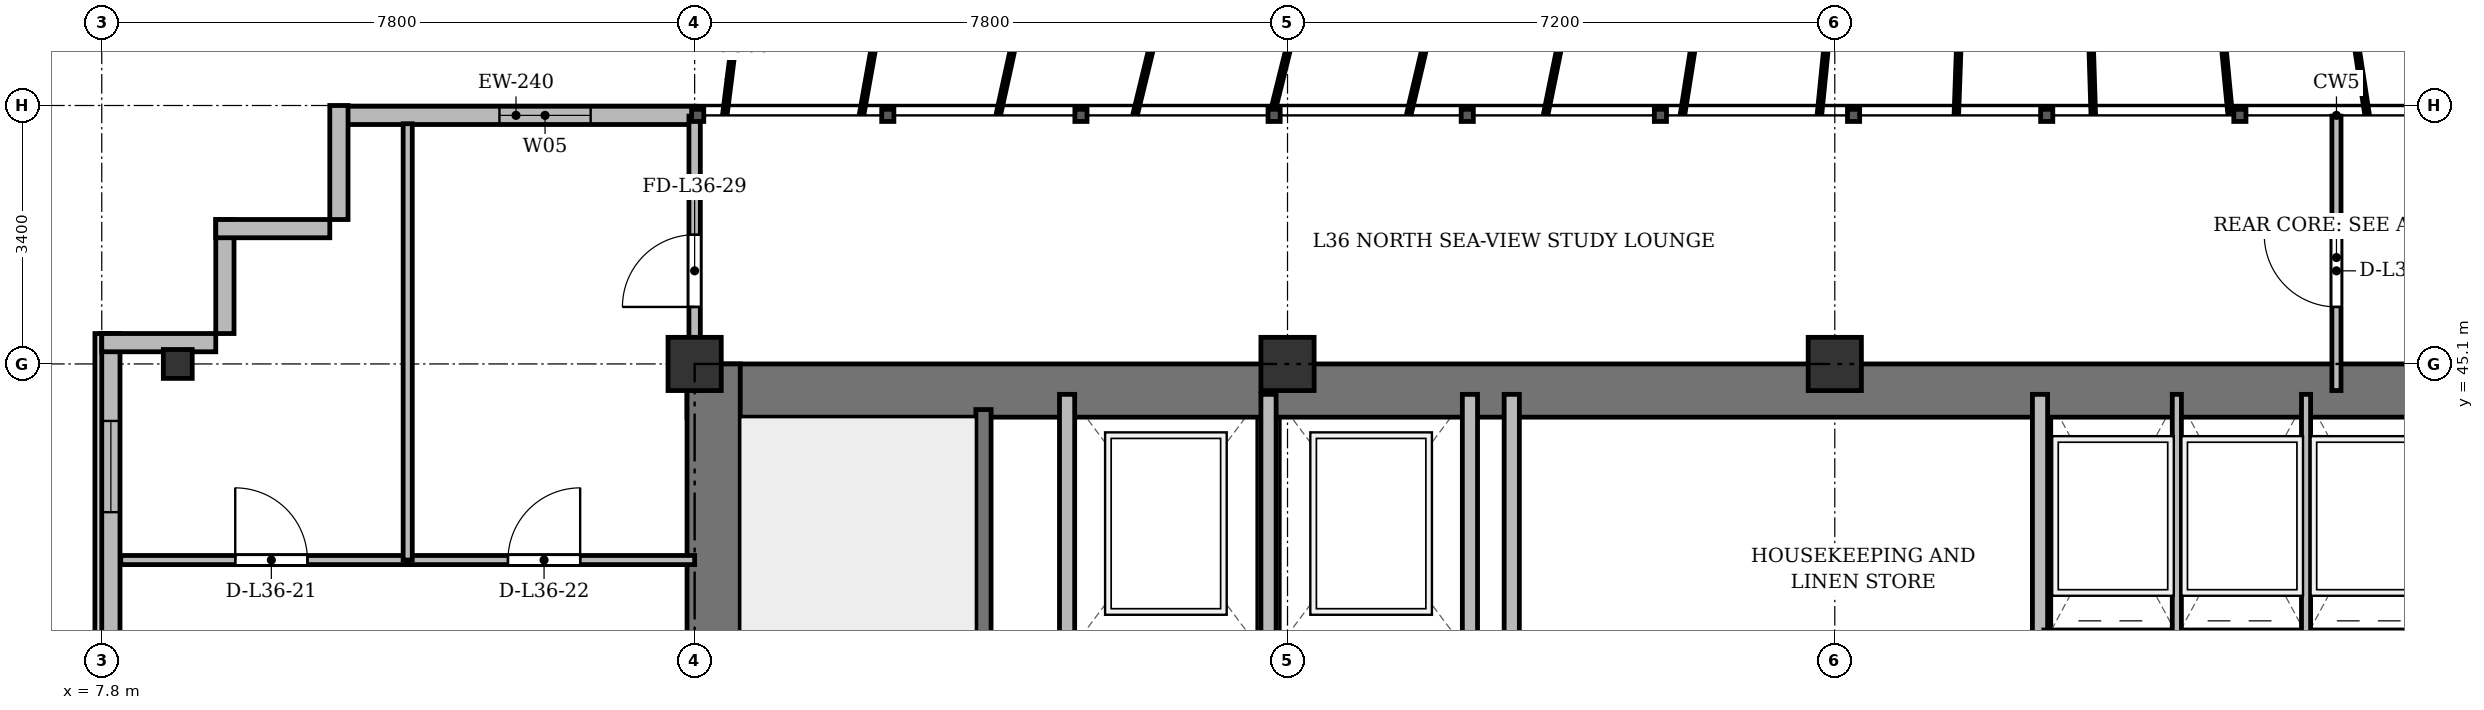
"""IFC4 building model, lengths in metres.
Left out: names, types, materials, properties, quantities, classifications, styles, units other than length and angle.
Written with IfcOpenShell. Run it as: python <this file> out.ifc"""

import sys

from ifc_helpers import new_model, si_unit, direction, frame, frame_2d, origin, origin_2d, place, context, subcontext, project, spatial, rectangle, i_section, extrude, source, transform, mapped, element, fill, save


model = new_model("IFC4")
c1 = context("Model", 3, precision=1e-05, world=origin(), true_north=direction((0.0, 1.0)))
c2 = subcontext(c1, "Body", "Model", "MODEL_VIEW")
j1 = project(units=[si_unit("LENGTHUNIT", "METRE"), si_unit("PLANEANGLEUNIT", "RADIAN")], contexts=[c1])
p1 = place(None, origin())
s1 = spatial("IfcSite", under=j1, at=p1, CompositionType="ELEMENT")
p2 = place(p1, origin())
s2 = spatial("IfcBuilding", under=s1, at=p2, CompositionType="ELEMENT")
p3 = place(p2, frame((0.0, 0.0, 139.3)))
s3 = spatial("IfcBuildingStorey", under=s2, at=p3, CompositionType="ELEMENT", Elevation=139.3)
m1 = source(origin(), c2, "Body", "SweptSolid", [
    extrude(i_section(OverallWidth=0.38, OverallDepth=0.38, WebThickness=0.02, FlangeThickness=0.03, at=origin_2d()), origin(), (0.0, 0.0, 1.0), 3.6),
])
p4 = place(p3, frame((8.8, 45.1, 0.0), z_axis=(0.0, 0.0, 1.0), x_axis=(1.0, 0.0, 0.0)))
e1 = element("IfcColumn", 1, at=p4, inside=s3, PredefinedType="COLUMN", context=c2, shape_type="MappedRepresentation", body=[
    mapped(m1, transform((0.0, 0.0, 0.0), x_axis=(1.0, 0.0, 0.0), y_axis=(0.0, 1.0, 0.0), z_axis=(0.0, 0.0, 1.0), scale=1.0)),
])
m2 = source(origin(), c2, "Body", "SweptSolid", [
    extrude(rectangle(XDim=0.7, YDim=0.7, at=origin_2d()), origin(), (0.0, 0.0, 1.0), 3.6),
])
for number, where, z_axis, x_axis in (
    (2, (15.6, 45.1, 0.0), (0.0, 0.0, 1.0), (1.0, 0.0, 0.0)),
    (3, (23.4, 45.1, 0.0), (0.0, 0.0, 1.0), (1.0, 0.0, 0.0)),
    (4, (30.6, 45.1, 0.0), (0.0, 0.0, 1.0), (1.0, 0.0, 0.0)),
):
    element("IfcColumn", number, at=place(p3, frame(where, z_axis=z_axis, x_axis=x_axis)), inside=s3, PredefinedType="COLUMN", context=c2, shape_type="MappedRepresentation", body=[
        mapped(m2, transform((0.0, 0.0, 0.0), x_axis=(1.0, 0.0, 0.0), y_axis=(0.0, 1.0, 0.0), z_axis=(0.0, 0.0, 1.0), scale=1.0)),
    ])
p5 = place(p3, frame((10.9, 48.37, 0.0), z_axis=(0.0, 0.0, 1.0), x_axis=(1.0, 0.0, 0.0)))
e5 = element("IfcWall", 5, at=p5, inside=s3, PredefinedType="SOLIDWALL", context=c2, shape_type="SweptSolid", body=[
    extrude(rectangle(XDim=4.7, YDim=0.24, at=frame_2d((2.35, 0.0))), origin(), (0.0, 0.0, 1.0), 3.35),
])
p6 = place(p5, frame((2.132, 0.0, 0.9)))
e6 = element("IfcOpeningElement", 6, at=p6, cuts=e5, PredefinedType="OPENING", context=c2, shape_type="SweptSolid", body=[
    extrude(rectangle(XDim=1.2, YDim=1.65, at=frame_2d((0.6, 0.825))), frame((0.0, 0.13, 0.0), z_axis=(0.0, -1.0, 0.0), x_axis=(1.0, 0.0, 0.0)), (0.0, 0.0, 1.0), 0.26),
])
p7 = place(p3, frame((7.92, 6.3, 0.0), z_axis=(0.0, 0.0, 1.0), x_axis=(0.0, 1.0, 0.0)))
e7 = element("IfcWall", 7, at=p7, inside=s3, PredefinedType="SOLIDWALL", context=c2, shape_type="SweptSolid", body=[
    extrude(rectangle(XDim=39.2, YDim=0.24, at=frame_2d((19.6, 0.0))), origin(), (0.0, 0.0, 1.0), 3.35),
])
p8 = place(p7, frame((1.45, 0.0, 0.92)))
e8 = element("IfcOpeningElement", 8, at=p8, cuts=e7, PredefinedType="OPENING", context=c2, shape_type="SweptSolid", body=[
    extrude(rectangle(XDim=1.2, YDim=1.65, at=frame_2d((0.6, 0.825))), frame((0.0, 0.13, 0.0), z_axis=(0.0, -1.0, 0.0), x_axis=(1.0, 0.0, 0.0)), (0.0, 0.0, 1.0), 0.26),
])
p9 = place(p7, frame((3.8, 0.0, 0.92)))
e9 = element("IfcOpeningElement", 9, at=p9, cuts=e7, PredefinedType="OPENING", context=c2, shape_type="SweptSolid", body=[
    extrude(rectangle(XDim=2.6, YDim=1.9, at=frame_2d((1.3, 0.95))), frame((0.0, 0.13, 0.0), z_axis=(0.0, -1.0, 0.0), x_axis=(1.0, 0.0, 0.0)), (0.0, 0.0, 1.0), 0.26),
])
p10 = place(p7, frame((8.0, 0.0, 0.92)))
e10 = element("IfcOpeningElement", 10, at=p10, cuts=e7, PredefinedType="OPENING", context=c2, shape_type="SweptSolid", body=[
    extrude(rectangle(XDim=2.6, YDim=1.9, at=frame_2d((1.3, 0.95))), frame((0.0, 0.13, 0.0), z_axis=(0.0, -1.0, 0.0), x_axis=(1.0, 0.0, 0.0)), (0.0, 0.0, 1.0), 0.26),
])
p11 = place(p7, frame((15.2, 0.0, 0.92)))
e11 = element("IfcOpeningElement", 11, at=p11, cuts=e7, PredefinedType="OPENING", context=c2, shape_type="SweptSolid", body=[
    extrude(rectangle(XDim=2.6, YDim=1.9, at=frame_2d((1.3, 0.95))), frame((0.0, 0.13, 0.0), z_axis=(0.0, -1.0, 0.0), x_axis=(1.0, 0.0, 0.0)), (0.0, 0.0, 1.0), 0.26),
])
p12 = place(p7, frame((33.5, 0.0, 0.92)))
e12 = element("IfcOpeningElement", 12, at=p12, cuts=e7, PredefinedType="OPENING", context=c2, shape_type="SweptSolid", body=[
    extrude(rectangle(XDim=1.2, YDim=1.65, at=frame_2d((0.6, 0.825))), frame((0.0, 0.13, 0.0), z_axis=(0.0, -1.0, 0.0), x_axis=(1.0, 0.0, 0.0)), (0.0, 0.0, 1.0), 0.26),
])
p13 = place(p7, frame((36.85, 0.0, 0.92)))
e13 = element("IfcOpeningElement", 13, at=p13, cuts=e7, PredefinedType="OPENING", context=c2, shape_type="SweptSolid", body=[
    extrude(rectangle(XDim=1.2, YDim=1.65, at=frame_2d((0.6, 0.825))), frame((0.0, 0.13, 0.0), z_axis=(0.0, -1.0, 0.0), x_axis=(1.0, 0.0, 0.0)), (0.0, 0.0, 1.0), 0.26),
])
for number, where, z_axis, x_axis in (
    (14, (7.8, 45.38, 0.0), (0.0, 0.0, 1.0), (1.0, 0.0, 0.0)),
    (15, (9.42, 45.5, 0.0), (0.0, 0.0, 1.0), (0.0, 1.0, 0.0)),
    (16, (9.3, 46.88, 0.0), (0.0, 0.0, 1.0), (1.0, 0.0, 0.0)),
    (17, (10.92, 47.0, 0.0), (0.0, 0.0, 1.0), (0.0, 1.0, 0.0)),
):
    element("IfcWall", number, at=place(p3, frame(where, z_axis=z_axis, x_axis=x_axis)), inside=s3, PredefinedType="SOLIDWALL", context=c2, shape_type="SweptSolid", body=[
        extrude(rectangle(XDim=1.5, YDim=0.24, at=frame_2d((0.75, 0.0))), origin(), (0.0, 0.0, 1.0), 3.35),
    ])
p14 = place(p3, frame((15.5, 44.75, 0.0), z_axis=(0.0, 0.0, 1.0), x_axis=(1.0, 0.0, 0.0)))
e18 = element("IfcWall", 18, at=p14, inside=s3, PredefinedType="SHEAR", context=c2, shape_type="SweptSolid", body=[
    extrude(rectangle(XDim=43.4, YDim=0.7, at=frame_2d((21.7, 0.0))), origin(), (0.0, 0.0, 1.0), 3.35),
])
p15 = place(p3, frame((15.85, 33.4, 0.0), z_axis=(0.0, 0.0, 1.0), x_axis=(0.0, 1.0, 0.0)))
e19 = element("IfcWall", 19, at=p15, inside=s3, PredefinedType="SHEAR", context=c2, shape_type="SweptSolid", body=[
    extrude(rectangle(XDim=11.7, YDim=0.7, at=frame_2d((5.85, 0.0))), origin(), (0.0, 0.0, 1.0), 3.35),
])
p16 = place(p3, frame((19.4, 33.4, 0.0), z_axis=(0.0, 0.0, 1.0), x_axis=(0.0, 1.0, 0.0)))
e20 = element("IfcWall", 20, at=p16, inside=s3, PredefinedType="SHEAR", context=c2, shape_type="SweptSolid", body=[
    extrude(rectangle(XDim=11.1, YDim=0.2, at=frame_2d((5.55, 0.0))), origin(), (0.0, 0.0, 1.0), 3.35),
])
p17 = place(p16, frame((0.85, 0.0, 0.0)))
e21 = element("IfcOpeningElement", 21, at=p17, cuts=e20, PredefinedType="OPENING", context=c2, shape_type="SweptSolid", body=[
    extrude(rectangle(XDim=1.1, YDim=2.15, at=frame_2d((0.55, 1.075))), frame((0.0, 0.11, 0.0), z_axis=(0.0, -1.0, 0.0), x_axis=(1.0, 0.0, 0.0)), (0.0, 0.0, 1.0), 0.22),
])
for number, where, z_axis, x_axis in (
    (22, (20.5, 41.3, 0.0), (0.0, 0.0, 1.0), (0.0, 1.0, 0.0)),
    (23, (23.15, 41.3, 0.0), (0.0, 0.0, 1.0), (0.0, 1.0, 0.0)),
    (24, (25.8, 41.3, 0.0), (0.0, 0.0, 1.0), (0.0, 1.0, 0.0)),
):
    element("IfcWall", number, at=place(p3, frame(where, z_axis=z_axis, x_axis=x_axis)), inside=s3, PredefinedType="SOLIDWALL", context=c2, shape_type="SweptSolid", body=[
        extrude(rectangle(XDim=3.4, YDim=0.2, at=frame_2d((1.7, 0.0))), origin(), (0.0, 0.0, 1.0), 3.35),
    ])
for number, where, z_axis, x_axis in (
    (25, (26.35, 33.4, 0.0), (0.0, 0.0, 1.0), (0.0, 1.0, 0.0)),
    (26, (33.3, 33.4, 0.0), (0.0, 0.0, 1.0), (0.0, 1.0, 0.0)),
):
    element("IfcWall", number, at=place(p3, frame(where, z_axis=z_axis, x_axis=x_axis)), inside=s3, PredefinedType="SOLIDWALL", context=c2, shape_type="SweptSolid", body=[
        extrude(rectangle(XDim=11.3, YDim=0.2, at=frame_2d((5.65, 0.0))), origin(), (0.0, 0.0, 1.0), 2.75),
    ])
for number, where, z_axis, x_axis in (
    (27, (35.1, 41.5, 0.0), (0.0, 0.0, 1.0), (0.0, 1.0, 0.0)),
    (28, (36.8, 41.5, 0.0), (0.0, 0.0, 1.0), (0.0, 1.0, 0.0)),
):
    element("IfcWall", number, at=place(p3, frame(where, z_axis=z_axis, x_axis=x_axis)), inside=s3, PredefinedType="PARTITIONING", context=c2, shape_type="SweptSolid", body=[
        extrude(rectangle(XDim=3.2, YDim=0.12, at=frame_2d((1.6, 0.0))), origin(), (0.0, 0.0, 1.0), 3.35),
    ])
p18 = place(p3, frame((8.05, 42.52, 0.0), z_axis=(0.0, 0.0, 1.0), x_axis=(1.0, 0.0, 0.0)))
e29 = element("IfcWall", 29, at=p18, inside=s3, PredefinedType="PARTITIONING", context=c2, shape_type="SweptSolid", body=[
    extrude(rectangle(XDim=3.775, YDim=0.12, at=frame_2d((1.887, 0.0))), origin(), (0.0, 0.0, 1.0), 2.85),
])
p19 = place(p18, frame((1.506, 0.0, 0.0)))
e30 = element("IfcOpeningElement", 30, at=p19, cuts=e29, PredefinedType="OPENING", context=c2, shape_type="SweptSolid", body=[
    extrude(rectangle(XDim=0.95, YDim=2.15, at=frame_2d((0.475, 1.075))), frame((0.0, 0.07, 0.0), z_axis=(0.0, -1.0, 0.0), x_axis=(1.0, 0.0, 0.0)), (0.0, 0.0, 1.0), 0.14),
])
p20 = place(p3, frame((11.825, 42.52, 0.0), z_axis=(0.0, 0.0, 1.0), x_axis=(1.0, 0.0, 0.0)))
e31 = element("IfcWall", 31, at=p20, inside=s3, PredefinedType="PARTITIONING", context=c2, shape_type="SweptSolid", body=[
    extrude(rectangle(XDim=3.775, YDim=0.12, at=frame_2d((1.888, 0.0))), origin(), (0.0, 0.0, 1.0), 2.85),
])
p21 = place(p20, frame((1.319, 0.0, 0.0)))
e32 = element("IfcOpeningElement", 32, at=p21, cuts=e31, PredefinedType="OPENING", context=c2, shape_type="SweptSolid", body=[
    extrude(rectangle(XDim=0.95, YDim=2.15, at=frame_2d((0.475, 1.075))), frame((0.0, 0.07, 0.0), z_axis=(0.0, -1.0, 0.0), x_axis=(1.0, 0.0, 0.0)), (0.0, 0.0, 1.0), 0.14),
])
p22 = place(p3, frame((11.825, 42.52, 0.0), z_axis=(0.0, 0.0, 1.0), x_axis=(0.0, 1.0, 0.0)))
e33 = element("IfcWall", 33, at=p22, inside=s3, PredefinedType="PARTITIONING", context=c2, shape_type="SweptSolid", body=[
    extrude(rectangle(XDim=5.74, YDim=0.12, at=frame_2d((2.87, 0.0))), origin(), (0.0, 0.0, 1.0), 2.75),
])
p23 = place(p3, frame((37.2, 44.75, 0.0), z_axis=(0.0, 0.0, 1.0), x_axis=(0.0, 1.0, 0.0)))
e34 = element("IfcWall", 34, at=p23, inside=s3, PredefinedType="PARTITIONING", context=c2, shape_type="SweptSolid", body=[
    extrude(rectangle(XDim=3.61, YDim=0.12, at=frame_2d((1.805, 0.0))), origin(), (0.0, 0.0, 1.0), 2.75),
])
p24 = place(p23, frame((1.1, 0.0, 0.0)))
e35 = element("IfcOpeningElement", 35, at=p24, cuts=e34, PredefinedType="OPENING", context=c2, shape_type="SweptSolid", body=[
    extrude(rectangle(XDim=0.95, YDim=2.15, at=frame_2d((0.475, 1.075))), frame((0.0, 0.07, 0.0), z_axis=(0.0, -1.0, 0.0), x_axis=(1.0, 0.0, 0.0)), (0.0, 0.0, 1.0), 0.14),
])
p25 = place(p3, frame((15.6, 44.75, 0.0), z_axis=(0.0, 0.0, 1.0), x_axis=(0.0, 1.0, 0.0)))
e36 = element("IfcWall", 36, at=p25, inside=s3, PredefinedType="PARTITIONING", context=c2, shape_type="SweptSolid", body=[
    extrude(rectangle(XDim=3.61, YDim=0.15, at=frame_2d((1.805, 0.0))), origin(), (0.0, 0.0, 1.0), 2.85),
])
p26 = place(p25, frame((1.1, 0.0, 0.0)))
e37 = element("IfcOpeningElement", 37, at=p26, cuts=e36, PredefinedType="OPENING", context=c2, shape_type="SweptSolid", body=[
    extrude(rectangle(XDim=0.95, YDim=2.15, at=frame_2d((0.475, 1.075))), frame((0.0, 0.085, 0.0), z_axis=(0.0, -1.0, 0.0), x_axis=(1.0, 0.0, 0.0)), (0.0, 0.0, 1.0), 0.17),
])
m3 = source(origin(), c2, "Body", "SweptSolid", [
    extrude(rectangle(XDim=1.2, YDim=1.65, at=frame_2d((0.6, 0.825))), frame((0.0, 0.03, 0.0), z_axis=(0.0, -1.0, 0.0), x_axis=(1.0, 0.0, 0.0)), (0.0, 0.0, 1.0), 0.06),
])
p27 = place(p6, origin())
e38 = element("IfcWindow", 38, at=p27, inside=s3, PartitioningType="SINGLE_PANEL", PredefinedType="WINDOW", context=c2, shape_type="MappedRepresentation", body=[
    mapped(m3, transform((0.0, 0.0, 0.0), x_axis=(1.0, 0.0, 0.0), y_axis=(0.0, 1.0, 0.0), z_axis=(0.0, 0.0, 1.0), scale=1.0)),
])
fill(e6, e38)
p28 = place(p13, origin())
e39 = element("IfcWindow", 39, at=p28, inside=s3, PartitioningType="SINGLE_PANEL", PredefinedType="WINDOW", context=c2, shape_type="MappedRepresentation", body=[
    mapped(m3, transform((0.0, 0.0, 0.0), x_axis=(1.0, 0.0, 0.0), y_axis=(0.0, 1.0, 0.0), z_axis=(0.0, 0.0, 1.0), scale=1.0)),
])
fill(e13, e39)
m4 = source(origin(), c2, "Body", "SweptSolid", [
    extrude(rectangle(XDim=0.95, YDim=2.15, at=frame_2d((0.475, 1.075))), frame((0.0, 0.025, 0.0), z_axis=(0.0, -1.0, 0.0), x_axis=(1.0, 0.0, 0.0)), (0.0, 0.0, 1.0), 0.05),
])
p29 = place(p19, origin())
e40 = element("IfcDoor", 40, at=p29, inside=s3, OperationType="SINGLE_SWING_LEFT", PredefinedType="DOOR", context=c2, shape_type="MappedRepresentation", body=[
    mapped(m4, transform((0.0, 0.0, 0.0), x_axis=(1.0, 0.0, 0.0), y_axis=(0.0, 1.0, 0.0), z_axis=(0.0, 0.0, 1.0), scale=1.0)),
])
fill(e30, e40)
p30 = place(p21, origin())
e41 = element("IfcDoor", 41, at=p30, inside=s3, OperationType="SINGLE_SWING_RIGHT", PredefinedType="DOOR", context=c2, shape_type="MappedRepresentation", body=[
    mapped(m4, transform((0.0, 0.0, 0.0), x_axis=(1.0, 0.0, 0.0), y_axis=(0.0, 1.0, 0.0), z_axis=(0.0, 0.0, 1.0), scale=1.0)),
])
fill(e32, e41)
p31 = place(p24, origin())
e42 = element("IfcDoor", 42, at=p31, inside=s3, OperationType="SINGLE_SWING_RIGHT", PredefinedType="DOOR", context=c2, shape_type="MappedRepresentation", body=[
    mapped(m4, transform((0.0, 0.0, 0.0), x_axis=(1.0, 0.0, 0.0), y_axis=(0.0, 1.0, 0.0), z_axis=(0.0, 0.0, 1.0), scale=1.0)),
])
fill(e35, e42)
p32 = place(p26, origin())
e43 = element("IfcDoor", 43, at=p32, inside=s3, OperationType="SINGLE_SWING_LEFT", PredefinedType="DOOR", context=c2, shape_type="MappedRepresentation", body=[
    mapped(m4, transform((0.0, 0.0, 0.0), x_axis=(1.0, 0.0, 0.0), y_axis=(0.0, 1.0, 0.0), z_axis=(0.0, 0.0, 1.0), scale=1.0)),
])
fill(e37, e43)
save(model, sys.argv[1])
